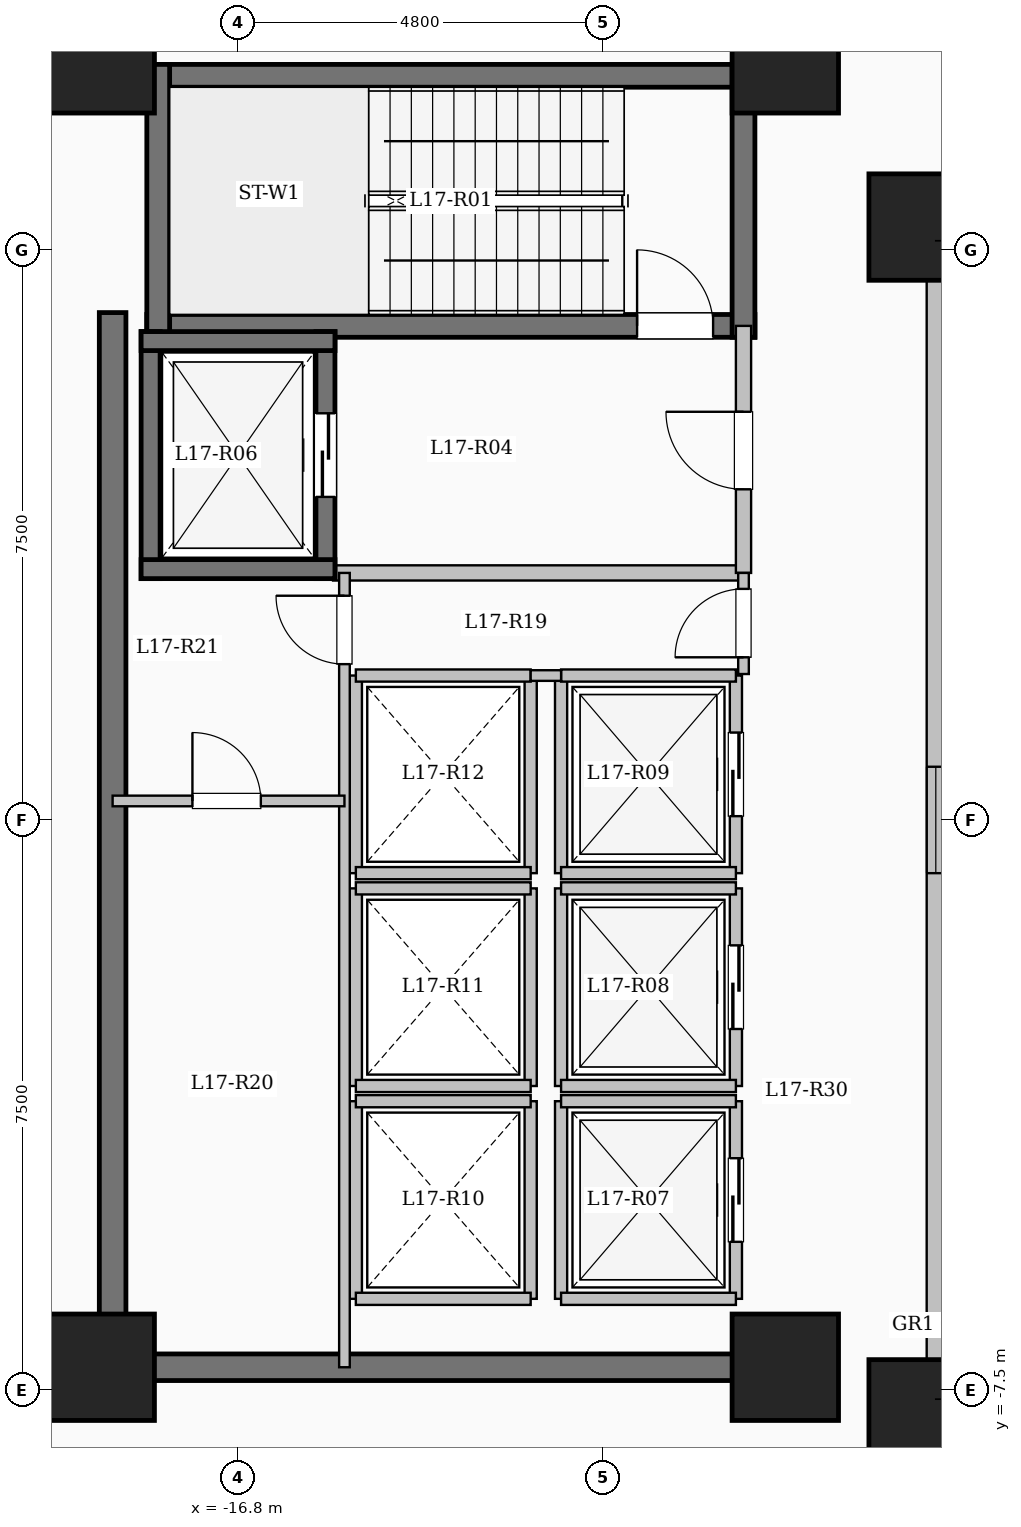
"""IFC4 building model, lengths in metres.
Left out: names, types, materials, properties, quantities, classifications, styles, units other than length and angle.
Written with IfcOpenShell. Run it as: python <this file> out.ifc"""

import sys

from ifc_helpers import new_model, si_unit, direction, frame, frame_2d, origin, origin_2d, place, context, subcontext, project, spatial, rectangle, extrude, element, fill, save


model = new_model("IFC4")
c1 = context("Model", 3, precision=1e-05, world=origin(), true_north=direction((0.0, 1.0)))
c2 = subcontext(c1, "Body", "Model", "MODEL_VIEW")
j1 = project(units=[si_unit("LENGTHUNIT", "METRE"), si_unit("PLANEANGLEUNIT", "RADIAN")], contexts=[c1])
p1 = place(None, origin())
s1 = spatial("IfcSite", under=j1, at=p1, CompositionType="ELEMENT")
p2 = place(p1, origin())
s2 = spatial("IfcBuilding", under=s1, at=p2, CompositionType="ELEMENT")
p3 = place(p2, frame((0.0, 0.0, 64.2)))
s3 = spatial("IfcBuildingStorey", under=s2, at=p3, CompositionType="ELEMENT", Elevation=64.2)
for number, where, z_axis, x_axis in (
    (1, (-7.8, -7.8, 0.0), (0.0, 0.0, 1.0), (1.0, 0.0, 0.0)),
    (2, (-7.8, 7.8, 0.0), (0.0, 0.0, 1.0), (1.0, 0.0, 0.0)),
    (3, (-9.6, -7.2, 0.0), (0.0, 0.0, 1.0), (1.0, 0.0, 0.0)),
    (4, (-9.6, 10.0, 0.0), (0.0, 0.0, 1.0), (1.0, 0.0, 0.0)),
    (5, (-18.6, -7.2, 0.0), (0.0, 0.0, 1.0), (1.0, 0.0, 0.0)),
    (6, (-18.6, 10.0, 0.0), (0.0, 0.0, 1.0), (1.0, 0.0, 0.0)),
):
    element("IfcColumn", number, at=place(p3, frame(where, z_axis=z_axis, x_axis=x_axis)), inside=s3, PredefinedType="COLUMN", context=c2, shape_type="SweptSolid", body=[
        extrude(rectangle(XDim=1.4, YDim=1.4, at=origin_2d()), origin(), (0.0, 0.0, 1.0), 4.5),
    ])
p4 = place(p3, frame((-7.62, 7.62, 0.0), z_axis=(0.0, 0.0, 1.0), x_axis=(0.0, -1.0, 0.0)))
e7 = element("IfcWall", 7, at=p4, inside=s3, PredefinedType="SOLIDWALL", context=c2, shape_type="SweptSolid", body=[
    extrude(rectangle(XDim=15.24, YDim=0.24, at=frame_2d((7.62, 0.0))), origin(), (0.0, 0.0, 1.0), 4.2),
])
p5 = place(p4, frame((6.92, 0.0, 0.95)))
e8 = element("IfcOpeningElement", 8, at=p5, cuts=e7, PredefinedType="OPENING", context=c2, shape_type="SweptSolid", body=[
    extrude(rectangle(XDim=1.4, YDim=1.5, at=frame_2d((0.7, 0.75))), frame((0.0, 0.13, 0.0), z_axis=(0.0, -1.0, 0.0), x_axis=(1.0, 0.0, 0.0)), (0.0, 0.0, 1.0), 0.26),
])
p6 = place(p3, frame((-18.0, 9.79, 0.0), z_axis=(0.0, 0.0, 1.0), x_axis=(1.0, 0.0, 0.0)))
e9 = element("IfcWall", 9, at=p6, inside=s3, PredefinedType="SHEAR", context=c2, shape_type="SweptSolid", body=[
    extrude(rectangle(XDim=8.0, YDim=0.3, at=frame_2d((4.0, 0.0))), origin(), (0.0, 0.0, 1.0), 4.5),
])
p7 = place(p3, frame((-18.0, 6.5, 0.0), z_axis=(0.0, 0.0, 1.0), x_axis=(1.0, 0.0, 0.0)))
e10 = element("IfcWall", 10, at=p7, inside=s3, PredefinedType="SHEAR", context=c2, shape_type="SweptSolid", body=[
    extrude(rectangle(XDim=8.0, YDim=0.3, at=frame_2d((4.0, 0.0))), origin(), (0.0, 0.0, 1.0), 4.5),
])
p8 = place(p7, frame((6.45, 0.0, 0.0)))
e11 = element("IfcOpeningElement", 11, at=p8, cuts=e10, PredefinedType="OPENING", context=c2, shape_type="SweptSolid", body=[
    extrude(rectangle(XDim=1.0, YDim=2.15, at=frame_2d((0.5, 1.075))), frame((0.0, 0.16, 0.0), z_axis=(0.0, -1.0, 0.0), x_axis=(1.0, 0.0, 0.0)), (0.0, 0.0, 1.0), 0.32),
])
for number, where, z_axis, x_axis in (
    (12, (-17.85, 6.35, 0.0), (0.0, 0.0, 1.0), (0.0, 1.0, 0.0)),
    (13, (-10.15, 6.35, 0.0), (0.0, 0.0, 1.0), (0.0, 1.0, 0.0)),
):
    element("IfcWall", number, at=place(p3, frame(where, z_axis=z_axis, x_axis=x_axis)), inside=s3, PredefinedType="SHEAR", context=c2, shape_type="SweptSolid", body=[
        extrude(rectangle(XDim=3.59, YDim=0.3, at=frame_2d((1.795, 0.0))), origin(), (0.0, 0.0, 1.0), 4.5),
    ])
p9 = place(p3, frame((-15.55, 3.25, 0.0), z_axis=(0.0, 0.0, 1.0), x_axis=(1.0, 0.0, 0.0)))
e14 = element("IfcWall", 14, at=p9, inside=s3, PredefinedType="SOLIDWALL", context=c2, shape_type="SweptSolid", body=[
    extrude(rectangle(XDim=5.4, YDim=0.2, at=frame_2d((2.7, 0.0))), origin(), (0.0, 0.0, 1.0), 4.2),
])
p10 = place(p3, frame((-10.15, 3.25, 0.0), z_axis=(0.0, 0.0, 1.0), x_axis=(0.0, 1.0, 0.0)))
e15 = element("IfcWall", 15, at=p10, inside=s3, PredefinedType="SOLIDWALL", context=c2, shape_type="SweptSolid", body=[
    extrude(rectangle(XDim=3.25, YDim=0.2, at=frame_2d((1.625, 0.0))), origin(), (0.0, 0.0, 1.0), 4.2),
])
p11 = place(p10, frame((1.1, 0.0, 0.0)))
e16 = element("IfcOpeningElement", 16, at=p11, cuts=e15, PredefinedType="OPENING", context=c2, shape_type="SweptSolid", body=[
    extrude(rectangle(XDim=1.02, YDim=2.15, at=frame_2d((0.51, 1.075))), frame((0.0, 0.11, 0.0), z_axis=(0.0, -1.0, 0.0), x_axis=(1.0, 0.0, 0.0)), (0.0, 0.0, 1.0), 0.22),
])
p12 = place(p3, frame((-17.95, 3.175, 0.0), z_axis=(0.0, 0.0, 1.0), x_axis=(0.0, 1.0, 0.0)))
e17 = element("IfcWall", 17, at=p12, inside=s3, PredefinedType="SHEAR", context=c2, shape_type="SweptSolid", body=[
    extrude(rectangle(XDim=3.25, YDim=0.25, at=frame_2d((1.625, 0.0))), origin(), (0.0, 0.0, 1.0), 4.5),
])
p13 = place(p3, frame((-15.65, 3.175, 0.0), z_axis=(0.0, 0.0, 1.0), x_axis=(0.0, 1.0, 0.0)))
e18 = element("IfcWall", 18, at=p13, inside=s3, PredefinedType="SHEAR", context=c2, shape_type="SweptSolid", body=[
    extrude(rectangle(XDim=3.25, YDim=0.25, at=frame_2d((1.625, 0.0))), origin(), (0.0, 0.0, 1.0), 4.5),
])
p14 = place(p13, frame((1.075, 0.0, 0.0)))
e19 = element("IfcOpeningElement", 19, at=p14, cuts=e18, PredefinedType="OPENING", context=c2, shape_type="SweptSolid", body=[
    extrude(rectangle(XDim=1.1, YDim=2.15, at=frame_2d((0.55, 1.075))), frame((0.0, 0.135, 0.0), z_axis=(0.0, -1.0, 0.0), x_axis=(1.0, 0.0, 0.0)), (0.0, 0.0, 1.0), 0.27),
])
for number, where, z_axis, x_axis in (
    (20, (-18.075, 3.3, 0.0), (0.0, 0.0, 1.0), (1.0, 0.0, 0.0)),
    (21, (-18.075, 6.3, 0.0), (0.0, 0.0, 1.0), (1.0, 0.0, 0.0)),
):
    element("IfcWall", number, at=place(p3, frame(where, z_axis=z_axis, x_axis=x_axis)), inside=s3, PredefinedType="SHEAR", context=c2, shape_type="SweptSolid", body=[
        extrude(rectangle(XDim=2.55, YDim=0.25, at=frame_2d((1.275, 0.0))), origin(), (0.0, 0.0, 1.0), 4.5),
    ])
p15 = place(p3, frame((-12.55, -6.3, 0.0), z_axis=(0.0, 0.0, 1.0), x_axis=(0.0, 1.0, 0.0)))
e22 = element("IfcWall", 22, at=p15, inside=s3, PredefinedType="SOLIDWALL", context=c2, shape_type="SweptSolid", body=[
    extrude(rectangle(XDim=2.6, YDim=0.16, at=frame_2d((1.3, 0.0))), origin(), (0.0, 0.0, 1.0), 4.2),
])
p16 = place(p3, frame((-10.25, -6.3, 0.0), z_axis=(0.0, 0.0, 1.0), x_axis=(0.0, 1.0, 0.0)))
e23 = element("IfcWall", 23, at=p16, inside=s3, PredefinedType="SOLIDWALL", context=c2, shape_type="SweptSolid", body=[
    extrude(rectangle(XDim=2.6, YDim=0.16, at=frame_2d((1.3, 0.0))), origin(), (0.0, 0.0, 1.0), 4.2),
])
p17 = place(p16, frame((0.75, 0.0, 0.0)))
e24 = element("IfcOpeningElement", 24, at=p17, cuts=e23, PredefinedType="OPENING", context=c2, shape_type="SweptSolid", body=[
    extrude(rectangle(XDim=1.1, YDim=2.15, at=frame_2d((0.55, 1.075))), frame((0.0, 0.09, 0.0), z_axis=(0.0, -1.0, 0.0), x_axis=(1.0, 0.0, 0.0)), (0.0, 0.0, 1.0), 0.18),
])
for number, where, z_axis, x_axis in (
    (25, (-12.55, -6.3, 0.0), (0.0, 0.0, 1.0), (1.0, 0.0, 0.0)),
    (26, (-12.55, -3.7, 0.0), (0.0, 0.0, 1.0), (1.0, 0.0, 0.0)),
):
    element("IfcWall", number, at=place(p3, frame(where, z_axis=z_axis, x_axis=x_axis)), inside=s3, PredefinedType="SOLIDWALL", context=c2, shape_type="SweptSolid", body=[
        extrude(rectangle(XDim=2.3, YDim=0.16, at=frame_2d((1.15, 0.0))), origin(), (0.0, 0.0, 1.0), 4.2),
    ])
p18 = place(p3, frame((-12.55, -3.5, 0.0), z_axis=(0.0, 0.0, 1.0), x_axis=(0.0, 1.0, 0.0)))
e27 = element("IfcWall", 27, at=p18, inside=s3, PredefinedType="SOLIDWALL", context=c2, shape_type="SweptSolid", body=[
    extrude(rectangle(XDim=2.6, YDim=0.16, at=frame_2d((1.3, 0.0))), origin(), (0.0, 0.0, 1.0), 4.2),
])
p19 = place(p3, frame((-10.25, -3.5, 0.0), z_axis=(0.0, 0.0, 1.0), x_axis=(0.0, 1.0, 0.0)))
e28 = element("IfcWall", 28, at=p19, inside=s3, PredefinedType="SOLIDWALL", context=c2, shape_type="SweptSolid", body=[
    extrude(rectangle(XDim=2.6, YDim=0.16, at=frame_2d((1.3, 0.0))), origin(), (0.0, 0.0, 1.0), 4.2),
])
p20 = place(p19, frame((0.75, 0.0, 0.0)))
e29 = element("IfcOpeningElement", 29, at=p20, cuts=e28, PredefinedType="OPENING", context=c2, shape_type="SweptSolid", body=[
    extrude(rectangle(XDim=1.1, YDim=2.15, at=frame_2d((0.55, 1.075))), frame((0.0, 0.09, 0.0), z_axis=(0.0, -1.0, 0.0), x_axis=(1.0, 0.0, 0.0)), (0.0, 0.0, 1.0), 0.18),
])
for number, where, z_axis, x_axis in (
    (30, (-12.55, -3.5, 0.0), (0.0, 0.0, 1.0), (1.0, 0.0, 0.0)),
    (31, (-12.55, -0.9, 0.0), (0.0, 0.0, 1.0), (1.0, 0.0, 0.0)),
):
    element("IfcWall", number, at=place(p3, frame(where, z_axis=z_axis, x_axis=x_axis)), inside=s3, PredefinedType="SOLIDWALL", context=c2, shape_type="SweptSolid", body=[
        extrude(rectangle(XDim=2.3, YDim=0.16, at=frame_2d((1.15, 0.0))), origin(), (0.0, 0.0, 1.0), 4.2),
    ])
p21 = place(p3, frame((-12.55, -0.7, 0.0), z_axis=(0.0, 0.0, 1.0), x_axis=(0.0, 1.0, 0.0)))
e32 = element("IfcWall", 32, at=p21, inside=s3, PredefinedType="SOLIDWALL", context=c2, shape_type="SweptSolid", body=[
    extrude(rectangle(XDim=2.6, YDim=0.16, at=frame_2d((1.3, 0.0))), origin(), (0.0, 0.0, 1.0), 4.2),
])
p22 = place(p3, frame((-10.25, -0.7, 0.0), z_axis=(0.0, 0.0, 1.0), x_axis=(0.0, 1.0, 0.0)))
e33 = element("IfcWall", 33, at=p22, inside=s3, PredefinedType="SOLIDWALL", context=c2, shape_type="SweptSolid", body=[
    extrude(rectangle(XDim=2.6, YDim=0.16, at=frame_2d((1.3, 0.0))), origin(), (0.0, 0.0, 1.0), 4.2),
])
p23 = place(p22, frame((0.75, 0.0, 0.0)))
e34 = element("IfcOpeningElement", 34, at=p23, cuts=e33, PredefinedType="OPENING", context=c2, shape_type="SweptSolid", body=[
    extrude(rectangle(XDim=1.1, YDim=2.15, at=frame_2d((0.55, 1.075))), frame((0.0, 0.09, 0.0), z_axis=(0.0, -1.0, 0.0), x_axis=(1.0, 0.0, 0.0)), (0.0, 0.0, 1.0), 0.18),
])
for number, where, z_axis, x_axis in (
    (35, (-12.55, -0.7, 0.0), (0.0, 0.0, 1.0), (1.0, 0.0, 0.0)),
    (36, (-12.55, 1.9, 0.0), (0.0, 0.0, 1.0), (1.0, 0.0, 0.0)),
):
    element("IfcWall", number, at=place(p3, frame(where, z_axis=z_axis, x_axis=x_axis)), inside=s3, PredefinedType="SOLIDWALL", context=c2, shape_type="SweptSolid", body=[
        extrude(rectangle(XDim=2.3, YDim=0.16, at=frame_2d((1.15, 0.0))), origin(), (0.0, 0.0, 1.0), 4.2),
    ])
for number, where, z_axis, x_axis in (
    (37, (-15.25, -6.3, 0.0), (0.0, 0.0, 1.0), (0.0, 1.0, 0.0)),
    (38, (-12.95, -6.3, 0.0), (0.0, 0.0, 1.0), (0.0, 1.0, 0.0)),
):
    element("IfcWall", number, at=place(p3, frame(where, z_axis=z_axis, x_axis=x_axis)), inside=s3, PredefinedType="SOLIDWALL", context=c2, shape_type="SweptSolid", body=[
        extrude(rectangle(XDim=2.6, YDim=0.16, at=frame_2d((1.3, 0.0))), origin(), (0.0, 0.0, 1.0), 4.2),
    ])
for number, where, z_axis, x_axis in (
    (39, (-15.25, -6.3, 0.0), (0.0, 0.0, 1.0), (1.0, 0.0, 0.0)),
    (40, (-15.25, -3.7, 0.0), (0.0, 0.0, 1.0), (1.0, 0.0, 0.0)),
):
    element("IfcWall", number, at=place(p3, frame(where, z_axis=z_axis, x_axis=x_axis)), inside=s3, PredefinedType="SOLIDWALL", context=c2, shape_type="SweptSolid", body=[
        extrude(rectangle(XDim=2.3, YDim=0.16, at=frame_2d((1.15, 0.0))), origin(), (0.0, 0.0, 1.0), 4.2),
    ])
for number, where, z_axis, x_axis in (
    (41, (-15.25, -3.5, 0.0), (0.0, 0.0, 1.0), (0.0, 1.0, 0.0)),
    (42, (-12.95, -3.5, 0.0), (0.0, 0.0, 1.0), (0.0, 1.0, 0.0)),
):
    element("IfcWall", number, at=place(p3, frame(where, z_axis=z_axis, x_axis=x_axis)), inside=s3, PredefinedType="SOLIDWALL", context=c2, shape_type="SweptSolid", body=[
        extrude(rectangle(XDim=2.6, YDim=0.16, at=frame_2d((1.3, 0.0))), origin(), (0.0, 0.0, 1.0), 4.2),
    ])
for number, where, z_axis, x_axis in (
    (43, (-15.25, -3.5, 0.0), (0.0, 0.0, 1.0), (1.0, 0.0, 0.0)),
    (44, (-15.25, -0.9, 0.0), (0.0, 0.0, 1.0), (1.0, 0.0, 0.0)),
):
    element("IfcWall", number, at=place(p3, frame(where, z_axis=z_axis, x_axis=x_axis)), inside=s3, PredefinedType="SOLIDWALL", context=c2, shape_type="SweptSolid", body=[
        extrude(rectangle(XDim=2.3, YDim=0.16, at=frame_2d((1.15, 0.0))), origin(), (0.0, 0.0, 1.0), 4.2),
    ])
for number, where, z_axis, x_axis in (
    (45, (-15.25, -0.7, 0.0), (0.0, 0.0, 1.0), (0.0, 1.0, 0.0)),
    (46, (-12.95, -0.7, 0.0), (0.0, 0.0, 1.0), (0.0, 1.0, 0.0)),
):
    element("IfcWall", number, at=place(p3, frame(where, z_axis=z_axis, x_axis=x_axis)), inside=s3, PredefinedType="SOLIDWALL", context=c2, shape_type="SweptSolid", body=[
        extrude(rectangle(XDim=2.6, YDim=0.16, at=frame_2d((1.3, 0.0))), origin(), (0.0, 0.0, 1.0), 4.2),
    ])
for number, where, z_axis, x_axis in (
    (47, (-15.25, -0.7, 0.0), (0.0, 0.0, 1.0), (1.0, 0.0, 0.0)),
    (48, (-15.25, 1.9, 0.0), (0.0, 0.0, 1.0), (1.0, 0.0, 0.0)),
):
    element("IfcWall", number, at=place(p3, frame(where, z_axis=z_axis, x_axis=x_axis)), inside=s3, PredefinedType="SOLIDWALL", context=c2, shape_type="SweptSolid", body=[
        extrude(rectangle(XDim=2.3, YDim=0.16, at=frame_2d((1.15, 0.0))), origin(), (0.0, 0.0, 1.0), 4.2),
    ])
p24 = place(p3, frame((-18.45, -7.375, 0.0), z_axis=(0.0, 0.0, 1.0), x_axis=(0.0, 1.0, 0.0)))
e49 = element("IfcWall", 49, at=p24, inside=s3, PredefinedType="SHEAR", context=c2, shape_type="SweptSolid", body=[
    extrude(rectangle(XDim=14.05, YDim=0.35, at=frame_2d((7.025, 0.0))), origin(), (0.0, 0.0, 1.0), 4.5),
])
p25 = place(p3, frame((-18.625, -7.2, 0.0), z_axis=(0.0, 0.0, 1.0), x_axis=(1.0, 0.0, 0.0)))
e50 = element("IfcWall", 50, at=p25, inside=s3, PredefinedType="SHEAR", context=c2, shape_type="SweptSolid", body=[
    extrude(rectangle(XDim=8.55, YDim=0.35, at=frame_2d((4.275, 0.0))), origin(), (0.0, 0.0, 1.0), 4.5),
])
p26 = place(p3, frame((-12.95, 1.9, 0.0), z_axis=(0.0, 0.0, 1.0), x_axis=(1.0, 0.0, 0.0)))
e51 = element("IfcWall", 51, at=p26, inside=s3, PredefinedType="PARTITIONING", context=c2, shape_type="SweptSolid", body=[
    extrude(rectangle(XDim=0.4, YDim=0.14, at=frame_2d((0.2, 0.0))), origin(), (0.0, 0.0, 1.0), 4.2),
])
p27 = place(p3, frame((-10.15, 1.92, 0.0), z_axis=(0.0, 0.0, 1.0), x_axis=(0.0, 1.0, 0.0)))
e52 = element("IfcWall", 52, at=p27, inside=s3, PredefinedType="PARTITIONING", context=c2, shape_type="SweptSolid", body=[
    extrude(rectangle(XDim=1.33, YDim=0.14, at=frame_2d((0.665, 0.0))), origin(), (0.0, 0.0, 1.0), 4.2),
])
p28 = place(p27, frame((0.22, 0.0, 0.0)))
e53 = element("IfcOpeningElement", 53, at=p28, cuts=e52, PredefinedType="OPENING", context=c2, shape_type="SweptSolid", body=[
    extrude(rectangle(XDim=0.9, YDim=2.08, at=frame_2d((0.45, 1.04))), frame((0.0, 0.08, 0.0), z_axis=(0.0, -1.0, 0.0), x_axis=(1.0, 0.0, 0.0)), (0.0, 0.0, 1.0), 0.16),
])
p29 = place(p3, frame((-15.4, -7.2, 0.0), z_axis=(0.0, 0.0, 1.0), x_axis=(0.0, 1.0, 0.0)))
e54 = element("IfcWall", 54, at=p29, inside=s3, PredefinedType="PARTITIONING", context=c2, shape_type="SweptSolid", body=[
    extrude(rectangle(XDim=10.45, YDim=0.14, at=frame_2d((5.225, 0.0))), origin(), (0.0, 0.0, 1.0), 4.2),
])
p30 = place(p29, frame((9.25, 0.0, 0.0)))
e55 = element("IfcOpeningElement", 55, at=p30, cuts=e54, PredefinedType="OPENING", context=c2, shape_type="SweptSolid", body=[
    extrude(rectangle(XDim=0.9, YDim=2.08, at=frame_2d((0.45, 1.04))), frame((0.0, 0.08, 0.0), z_axis=(0.0, -1.0, 0.0), x_axis=(1.0, 0.0, 0.0)), (0.0, 0.0, 1.0), 0.16),
])
p31 = place(p3, frame((-18.45, 0.25, 0.0), z_axis=(0.0, 0.0, 1.0), x_axis=(1.0, 0.0, 0.0)))
e56 = element("IfcWall", 56, at=p31, inside=s3, PredefinedType="PARTITIONING", context=c2, shape_type="SweptSolid", body=[
    extrude(rectangle(XDim=3.05, YDim=0.14, at=frame_2d((1.525, 0.0))), origin(), (0.0, 0.0, 1.0), 4.2),
])
p32 = place(p31, frame((1.05, 0.0, 0.0)))
e57 = element("IfcOpeningElement", 57, at=p32, cuts=e56, PredefinedType="OPENING", context=c2, shape_type="SweptSolid", body=[
    extrude(rectangle(XDim=0.9, YDim=2.08, at=frame_2d((0.45, 1.04))), frame((0.0, 0.08, 0.0), z_axis=(0.0, -1.0, 0.0), x_axis=(1.0, 0.0, 0.0)), (0.0, 0.0, 1.0), 0.16),
])
p33 = place(p3, frame((-28.68, -7.25, 0.0), z_axis=(0.0, 0.0, 1.0), x_axis=(1.0, 0.0, 0.0)))
e58 = element("IfcWall", 58, at=p33, inside=s3, PredefinedType="PARTITIONING", context=c2, shape_type="SweptSolid", body=[
    extrude(rectangle(XDim=10.23, YDim=0.15, at=frame_2d((5.115, 0.0))), origin(), (0.0, 0.0, 1.0), 4.2),
])
p34 = place(p33, frame((7.03, 0.0, 0.0)))
e59 = element("IfcOpeningElement", 59, at=p34, cuts=e58, PredefinedType="OPENING", context=c2, shape_type="SweptSolid", body=[
    extrude(rectangle(XDim=1.08, YDim=2.15, at=frame_2d((0.54, 1.075))), frame((0.0, 0.085, 0.0), z_axis=(0.0, -1.0, 0.0), x_axis=(1.0, 0.0, 0.0)), (0.0, 0.0, 1.0), 0.17),
])
p35 = place(p5, origin())
e60 = element("IfcWindow", 60, at=p35, inside=s3, PartitioningType="SINGLE_PANEL", PredefinedType="WINDOW", context=c2, shape_type="SweptSolid", body=[
    extrude(rectangle(XDim=1.4, YDim=1.5, at=frame_2d((0.7, 0.75))), frame((0.0, 0.03, 0.0), z_axis=(0.0, -1.0, 0.0), x_axis=(1.0, 0.0, 0.0)), (0.0, 0.0, 1.0), 0.06),
])
fill(e8, e60)
p36 = place(p8, origin())
e61 = element("IfcDoor", 61, at=p36, inside=s3, OperationType="SINGLE_SWING_LEFT", PredefinedType="DOOR", context=c2, shape_type="SweptSolid", body=[
    extrude(rectangle(XDim=1.0, YDim=2.15, at=frame_2d((0.5, 1.075))), frame((0.0, 0.025, 0.0), z_axis=(0.0, -1.0, 0.0), x_axis=(1.0, 0.0, 0.0)), (0.0, 0.0, 1.0), 0.05),
])
fill(e11, e61)
p37 = place(p11, origin())
e62 = element("IfcDoor", 62, at=p37, inside=s3, OperationType="SINGLE_SWING_RIGHT", PredefinedType="DOOR", context=c2, shape_type="SweptSolid", body=[
    extrude(rectangle(XDim=1.02, YDim=2.15, at=frame_2d((0.51, 1.075))), frame((0.0, 0.025, 0.0), z_axis=(0.0, -1.0, 0.0), x_axis=(1.0, 0.0, 0.0)), (0.0, 0.0, 1.0), 0.05),
])
fill(e16, e62)
p38 = place(p14, origin())
e63 = element("IfcDoor", 63, at=p38, inside=s3, OperationType="SLIDING_TO_LEFT", PredefinedType="DOOR", context=c2, shape_type="SweptSolid", body=[
    extrude(rectangle(XDim=1.1, YDim=2.15, at=frame_2d((0.55, 1.075))), frame((0.0, 0.025, 0.0), z_axis=(0.0, -1.0, 0.0), x_axis=(1.0, 0.0, 0.0)), (0.0, 0.0, 1.0), 0.05),
])
fill(e19, e63)
p39 = place(p17, origin())
e64 = element("IfcDoor", 64, at=p39, inside=s3, OperationType="SLIDING_TO_LEFT", PredefinedType="DOOR", context=c2, shape_type="SweptSolid", body=[
    extrude(rectangle(XDim=1.1, YDim=2.15, at=frame_2d((0.55, 1.075))), frame((0.0, 0.025, 0.0), z_axis=(0.0, -1.0, 0.0), x_axis=(1.0, 0.0, 0.0)), (0.0, 0.0, 1.0), 0.05),
])
fill(e24, e64)
p40 = place(p20, origin())
e65 = element("IfcDoor", 65, at=p40, inside=s3, OperationType="SLIDING_TO_LEFT", PredefinedType="DOOR", context=c2, shape_type="SweptSolid", body=[
    extrude(rectangle(XDim=1.1, YDim=2.15, at=frame_2d((0.55, 1.075))), frame((0.0, 0.025, 0.0), z_axis=(0.0, -1.0, 0.0), x_axis=(1.0, 0.0, 0.0)), (0.0, 0.0, 1.0), 0.05),
])
fill(e29, e65)
p41 = place(p23, origin())
e66 = element("IfcDoor", 66, at=p41, inside=s3, OperationType="SLIDING_TO_LEFT", PredefinedType="DOOR", context=c2, shape_type="SweptSolid", body=[
    extrude(rectangle(XDim=1.1, YDim=2.15, at=frame_2d((0.55, 1.075))), frame((0.0, 0.025, 0.0), z_axis=(0.0, -1.0, 0.0), x_axis=(1.0, 0.0, 0.0)), (0.0, 0.0, 1.0), 0.05),
])
fill(e34, e66)
p42 = place(p28, origin())
e67 = element("IfcDoor", 67, at=p42, inside=s3, OperationType="SINGLE_SWING_LEFT", PredefinedType="DOOR", context=c2, shape_type="SweptSolid", body=[
    extrude(rectangle(XDim=0.9, YDim=2.08, at=frame_2d((0.45, 1.04))), frame((0.0, 0.025, 0.0), z_axis=(0.0, -1.0, 0.0), x_axis=(1.0, 0.0, 0.0)), (0.0, 0.0, 1.0), 0.05),
])
fill(e53, e67)
p43 = place(p30, origin())
e68 = element("IfcDoor", 68, at=p43, inside=s3, OperationType="SINGLE_SWING_RIGHT", PredefinedType="DOOR", context=c2, shape_type="SweptSolid", body=[
    extrude(rectangle(XDim=0.9, YDim=2.08, at=frame_2d((0.45, 1.04))), frame((0.0, 0.025, 0.0), z_axis=(0.0, -1.0, 0.0), x_axis=(1.0, 0.0, 0.0)), (0.0, 0.0, 1.0), 0.05),
])
fill(e55, e68)
p44 = place(p32, origin())
e69 = element("IfcDoor", 69, at=p44, inside=s3, OperationType="SINGLE_SWING_LEFT", PredefinedType="DOOR", context=c2, shape_type="SweptSolid", body=[
    extrude(rectangle(XDim=0.9, YDim=2.08, at=frame_2d((0.45, 1.04))), frame((0.0, 0.025, 0.0), z_axis=(0.0, -1.0, 0.0), x_axis=(1.0, 0.0, 0.0)), (0.0, 0.0, 1.0), 0.05),
])
fill(e57, e69)
save(model, sys.argv[1])
